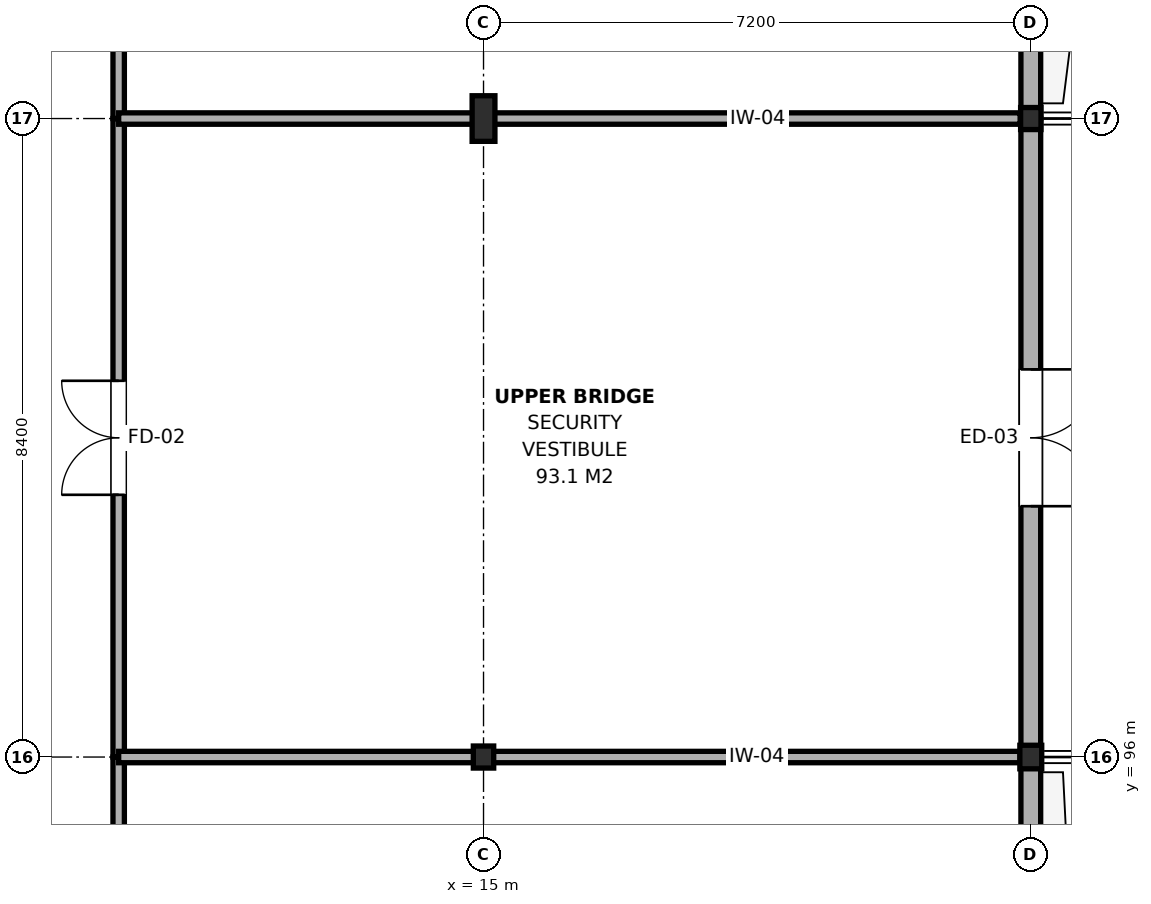
"""IFC4 building model, lengths in metres.
Left out: names, types, materials, properties, quantities, classifications, styles, units other than length and angle.
Written with IfcOpenShell. Run it as: python <this file> out.ifc"""

import sys

from ifc_helpers import new_model, si_unit, direction, frame, frame_2d, origin, origin_2d, place, context, subcontext, project, spatial, rectangle, i_section, extrude, element, fill, save


model = new_model("IFC4")
c1 = context("Model", 3, precision=1e-05, world=origin(), true_north=direction((0.0, 1.0)))
c2 = subcontext(c1, "Body", "Model", "MODEL_VIEW")
j1 = project(units=[si_unit("LENGTHUNIT", "METRE"), si_unit("PLANEANGLEUNIT", "RADIAN")], contexts=[c1])
p1 = place(None, origin())
s1 = spatial("IfcSite", under=j1, at=p1, CompositionType="ELEMENT")
p2 = place(p1, origin())
s2 = spatial("IfcBuilding", under=s1, at=p2, CompositionType="ELEMENT")
p3 = place(p2, frame((0.0, 0.0, 9.0)))
s3 = spatial("IfcBuildingStorey", under=s2, at=p3, CompositionType="ELEMENT", Elevation=9.0)
p4 = place(p3, frame((15.0, 96.0, 0.0), z_axis=(0.0, 0.0, 1.0), x_axis=(1.0, 0.0, 0.0)))
e1 = element("IfcColumn", 1, at=p4, inside=s3, PredefinedType="COLUMN", context=c2, shape_type="SweptSolid", body=[
    extrude(i_section(OverallWidth=0.268, OverallDepth=0.29, WebThickness=0.018, FlangeThickness=0.032, FilletRadius=0.024, at=origin_2d()), origin(), (0.0, 0.0, 1.0), 4.2),
])
p5 = place(p3, frame((15.0, 104.4, 0.0), z_axis=(0.0, 0.0, 1.0), x_axis=(1.0, 0.0, 0.0)))
e2 = element("IfcColumn", 2, at=p5, inside=s3, PredefinedType="COLUMN", context=c2, shape_type="SweptSolid", body=[
    extrude(i_section(OverallWidth=0.3, OverallDepth=0.6, WebThickness=0.015, FlangeThickness=0.03, FilletRadius=0.027, at=origin_2d()), origin(), (0.0, 0.0, 1.0), 4.2),
])
p6 = place(p3, frame((22.2, 96.0, 0.0), z_axis=(0.0, 0.0, 1.0), x_axis=(1.0, 0.0, 0.0)))
e3 = element("IfcColumn", 3, at=p6, inside=s3, PredefinedType="COLUMN", context=c2, shape_type="SweptSolid", body=[
    extrude(i_section(OverallWidth=0.288, OverallDepth=0.31, WebThickness=0.019, FlangeThickness=0.033, FilletRadius=0.024, at=origin_2d()), origin(), (0.0, 0.0, 1.0), 4.2),
])
p7 = place(p3, frame((22.2, 104.4, 0.0), z_axis=(0.0, 0.0, 1.0), x_axis=(1.0, 0.0, 0.0)))
e4 = element("IfcColumn", 4, at=p7, inside=s3, PredefinedType="COLUMN", context=c2, shape_type="SweptSolid", body=[
    extrude(i_section(OverallWidth=0.268, OverallDepth=0.29, WebThickness=0.018, FlangeThickness=0.032, FilletRadius=0.024, at=origin_2d()), origin(), (0.0, 0.0, 1.0), 4.2),
])
p8 = place(p3, frame((22.2, 88.2, 0.0), z_axis=(0.0, 0.0, 1.0), x_axis=(0.0, 1.0, 0.0)))
e5 = element("IfcWall", 5, at=p8, inside=s3, PredefinedType="SOLIDWALL", context=c2, shape_type="SweptSolid", body=[
    extrude(rectangle(XDim=7.8, YDim=0.26, at=frame_2d((3.9, 0.0))), origin(), (0.0, 0.0, 1.0), 3.425),
])
p9 = place(p8, frame((2.5, 0.0, 0.9)))
e6 = element("IfcOpeningElement", 6, at=p9, cuts=e5, PredefinedType="OPENING", context=c2, shape_type="SweptSolid", body=[
    extrude(rectangle(XDim=2.8, YDim=2.2, at=frame_2d((1.4, 1.1))), frame((0.0, 0.145, 0.0), z_axis=(0.0, -1.0, 0.0), x_axis=(1.0, 0.0, 0.0)), (0.0, 0.0, 1.0), 0.29),
])
p10 = place(p3, frame((22.2, 96.0, 0.0), z_axis=(0.0, 0.0, 1.0), x_axis=(0.0, 1.0, 0.0)))
e7 = element("IfcWall", 7, at=p10, inside=s3, PredefinedType="SOLIDWALL", context=c2, shape_type="SweptSolid", body=[
    extrude(rectangle(XDim=8.4, YDim=0.26, at=frame_2d((4.2, 0.0))), origin(), (0.0, 0.0, 1.0), 3.385),
])
p11 = place(p10, frame((3.3, 0.0, 0.0)))
e8 = element("IfcOpeningElement", 8, at=p11, cuts=e7, PredefinedType="OPENING", context=c2, shape_type="SweptSolid", body=[
    extrude(rectangle(XDim=1.8, YDim=2.2, at=frame_2d((0.9, 1.1))), frame((0.0, 0.145, 0.0), z_axis=(0.0, -1.0, 0.0), x_axis=(1.0, 0.0, 0.0)), (0.0, 0.0, 1.0), 0.29),
])
p12 = place(p3, frame((22.2, 104.4, 0.0), z_axis=(0.0, 0.0, 1.0), x_axis=(0.0, 1.0, 0.0)))
e9 = element("IfcWall", 9, at=p12, inside=s3, PredefinedType="SOLIDWALL", context=c2, shape_type="SweptSolid", body=[
    extrude(rectangle(XDim=9.0, YDim=0.26, at=frame_2d((4.5, 0.0))), origin(), (0.0, 0.0, 1.0), 3.385),
])
p13 = place(p12, frame((1.52, 0.0, 0.9)))
e10 = element("IfcOpeningElement", 10, at=p13, cuts=e9, PredefinedType="OPENING", context=c2, shape_type="SweptSolid", body=[
    extrude(rectangle(XDim=2.0, YDim=1.8, at=frame_2d((1.0, 0.9))), frame((0.0, 0.145, 0.0), z_axis=(0.0, -1.0, 0.0), x_axis=(1.0, 0.0, 0.0)), (0.0, 0.0, 1.0), 0.29),
])
p14 = place(p12, frame((5.48, 0.0, 0.9)))
e11 = element("IfcOpeningElement", 11, at=p14, cuts=e9, PredefinedType="OPENING", context=c2, shape_type="SweptSolid", body=[
    extrude(rectangle(XDim=2.0, YDim=1.8, at=frame_2d((1.0, 0.9))), frame((0.0, 0.145, 0.0), z_axis=(0.0, -1.0, 0.0), x_axis=(1.0, 0.0, 0.0)), (0.0, 0.0, 1.0), 0.29),
])
p15 = place(p3, frame((10.2, 66.6, 0.0), z_axis=(0.0, 0.0, 1.0), x_axis=(0.0, 1.0, 0.0)))
e12 = element("IfcWall", 12, at=p15, inside=s3, PredefinedType="PARTITIONING", context=c2, shape_type="SweptSolid", body=[
    extrude(rectangle(XDim=29.4, YDim=0.15, at=frame_2d((14.7, 0.0))), origin(), (0.0, 0.0, 1.0), 3.475),
])
p16 = place(p15, frame((13.9, 0.0, 0.0)))
e13 = element("IfcOpeningElement", 13, at=p16, cuts=e12, PredefinedType="OPENING", context=c2, shape_type="SweptSolid", body=[
    extrude(rectangle(XDim=1.6, YDim=2.15, at=frame_2d((0.8, 1.075))), frame((0.0, 0.09, 0.0), z_axis=(0.0, -1.0, 0.0), x_axis=(1.0, 0.0, 0.0)), (0.0, 0.0, 1.0), 0.18),
])
p17 = place(p15, frame((6.05, 0.0, 0.95)))
e14 = element("IfcOpeningElement", 14, at=p17, cuts=e12, PredefinedType="OPENING", context=c2, shape_type="SweptSolid", body=[
    extrude(rectangle(XDim=2.6, YDim=1.5, at=frame_2d((1.3, 0.75))), frame((0.0, 0.09, 0.0), z_axis=(0.0, -1.0, 0.0), x_axis=(1.0, 0.0, 0.0)), (0.0, 0.0, 1.0), 0.18),
])
p18 = place(p15, frame((20.75, 0.0, 0.95)))
e15 = element("IfcOpeningElement", 15, at=p18, cuts=e12, PredefinedType="OPENING", context=c2, shape_type="SweptSolid", body=[
    extrude(rectangle(XDim=2.6, YDim=1.5, at=frame_2d((1.3, 0.75))), frame((0.0, 0.09, 0.0), z_axis=(0.0, -1.0, 0.0), x_axis=(1.0, 0.0, 0.0)), (0.0, 0.0, 1.0), 0.18),
])
p19 = place(p3, frame((10.2, 96.0, 0.0), z_axis=(0.0, 0.0, 1.0), x_axis=(0.0, 1.0, 0.0)))
e16 = element("IfcWall", 16, at=p19, inside=s3, PredefinedType="PARTITIONING", context=c2, shape_type="SweptSolid", body=[
    extrude(rectangle(XDim=8.4, YDim=0.15, at=frame_2d((4.2, 0.0))), origin(), (0.0, 0.0, 1.0), 3.475),
])
p20 = place(p19, frame((3.45, 0.0, 0.0)))
e17 = element("IfcOpeningElement", 17, at=p20, cuts=e16, PredefinedType="OPENING", context=c2, shape_type="SweptSolid", body=[
    extrude(rectangle(XDim=1.5, YDim=2.15, at=frame_2d((0.75, 1.075))), frame((0.0, 0.09, 0.0), z_axis=(0.0, -1.0, 0.0), x_axis=(1.0, 0.0, 0.0)), (0.0, 0.0, 1.0), 0.18),
])
p21 = place(p3, frame((10.2, 96.0, 0.0), z_axis=(0.0, 0.0, 1.0), x_axis=(1.0, 0.0, 0.0)))
e18 = element("IfcWall", 18, at=p21, inside=s3, PredefinedType="PARTITIONING", context=c2, shape_type="SweptSolid", body=[
    extrude(rectangle(XDim=11.86, YDim=0.15, at=frame_2d((5.93, 0.0))), origin(), (0.0, 0.0, 1.0), 3.435),
])
p22 = place(p3, frame((10.2, 104.4, 0.0), z_axis=(0.0, 0.0, 1.0), x_axis=(0.0, 1.0, 0.0)))
e19 = element("IfcWall", 19, at=p22, inside=s3, PredefinedType="PARTITIONING", context=c2, shape_type="SweptSolid", body=[
    extrude(rectangle(XDim=26.24, YDim=0.15, at=frame_2d((13.12, 0.0))), origin(), (0.0, 0.0, 1.0), 3.375),
])
p23 = place(p22, frame((12.595, 0.0, 0.0)))
e20 = element("IfcOpeningElement", 20, at=p23, cuts=e19, PredefinedType="OPENING", context=c2, shape_type="SweptSolid", body=[
    extrude(rectangle(XDim=1.05, YDim=2.15, at=frame_2d((0.525, 1.075))), frame((0.0, 0.09, 0.0), z_axis=(0.0, -1.0, 0.0), x_axis=(1.0, 0.0, 0.0)), (0.0, 0.0, 1.0), 0.18),
])
p24 = place(p22, frame((5.26, 0.0, 0.95)))
e21 = element("IfcOpeningElement", 21, at=p24, cuts=e19, PredefinedType="OPENING", context=c2, shape_type="SweptSolid", body=[
    extrude(rectangle(XDim=2.6, YDim=1.5, at=frame_2d((1.3, 0.75))), frame((0.0, 0.09, 0.0), z_axis=(0.0, -1.0, 0.0), x_axis=(1.0, 0.0, 0.0)), (0.0, 0.0, 1.0), 0.18),
])
p25 = place(p22, frame((18.38, 0.0, 0.95)))
e22 = element("IfcOpeningElement", 22, at=p25, cuts=e19, PredefinedType="OPENING", context=c2, shape_type="SweptSolid", body=[
    extrude(rectangle(XDim=2.6, YDim=1.5, at=frame_2d((1.3, 0.75))), frame((0.0, 0.09, 0.0), z_axis=(0.0, -1.0, 0.0), x_axis=(1.0, 0.0, 0.0)), (0.0, 0.0, 1.0), 0.18),
])
p26 = place(p3, frame((10.2, 104.4, 0.0), z_axis=(0.0, 0.0, 1.0), x_axis=(1.0, 0.0, 0.0)))
e23 = element("IfcWall", 23, at=p26, inside=s3, PredefinedType="PARTITIONING", context=c2, shape_type="SweptSolid", body=[
    extrude(rectangle(XDim=11.86, YDim=0.15, at=frame_2d((5.93, 0.0))), origin(), (0.0, 0.0, 1.0), 3.385),
])
p27 = place(p11, frame((1.8, 0.0, 0.0), z_axis=(0.0, 0.0, 1.0), x_axis=(-1.0, 0.0, 0.0)))
e24 = element("IfcDoor", 24, at=p27, inside=s3, OperationType="DOUBLE_DOOR_SINGLE_SWING", PredefinedType="DOOR", context=c2, shape_type="SweptSolid", body=[
    extrude(rectangle(XDim=1.8, YDim=2.2, at=frame_2d((0.9, 1.1))), frame((0.0, 0.025, 0.0), z_axis=(0.0, -1.0, 0.0), x_axis=(1.0, 0.0, 0.0)), (0.0, 0.0, 1.0), 0.05),
])
fill(e8, e24)
p28 = place(p20, origin())
e25 = element("IfcDoor", 25, at=p28, inside=s3, OperationType="DOUBLE_DOOR_SINGLE_SWING", PredefinedType="DOOR", context=c2, shape_type="SweptSolid", body=[
    extrude(rectangle(XDim=1.5, YDim=2.15, at=frame_2d((0.75, 1.075))), frame((0.0, 0.025, 0.0), z_axis=(0.0, -1.0, 0.0), x_axis=(1.0, 0.0, 0.0)), (0.0, 0.0, 1.0), 0.05),
])
fill(e17, e25)
save(model, sys.argv[1])
